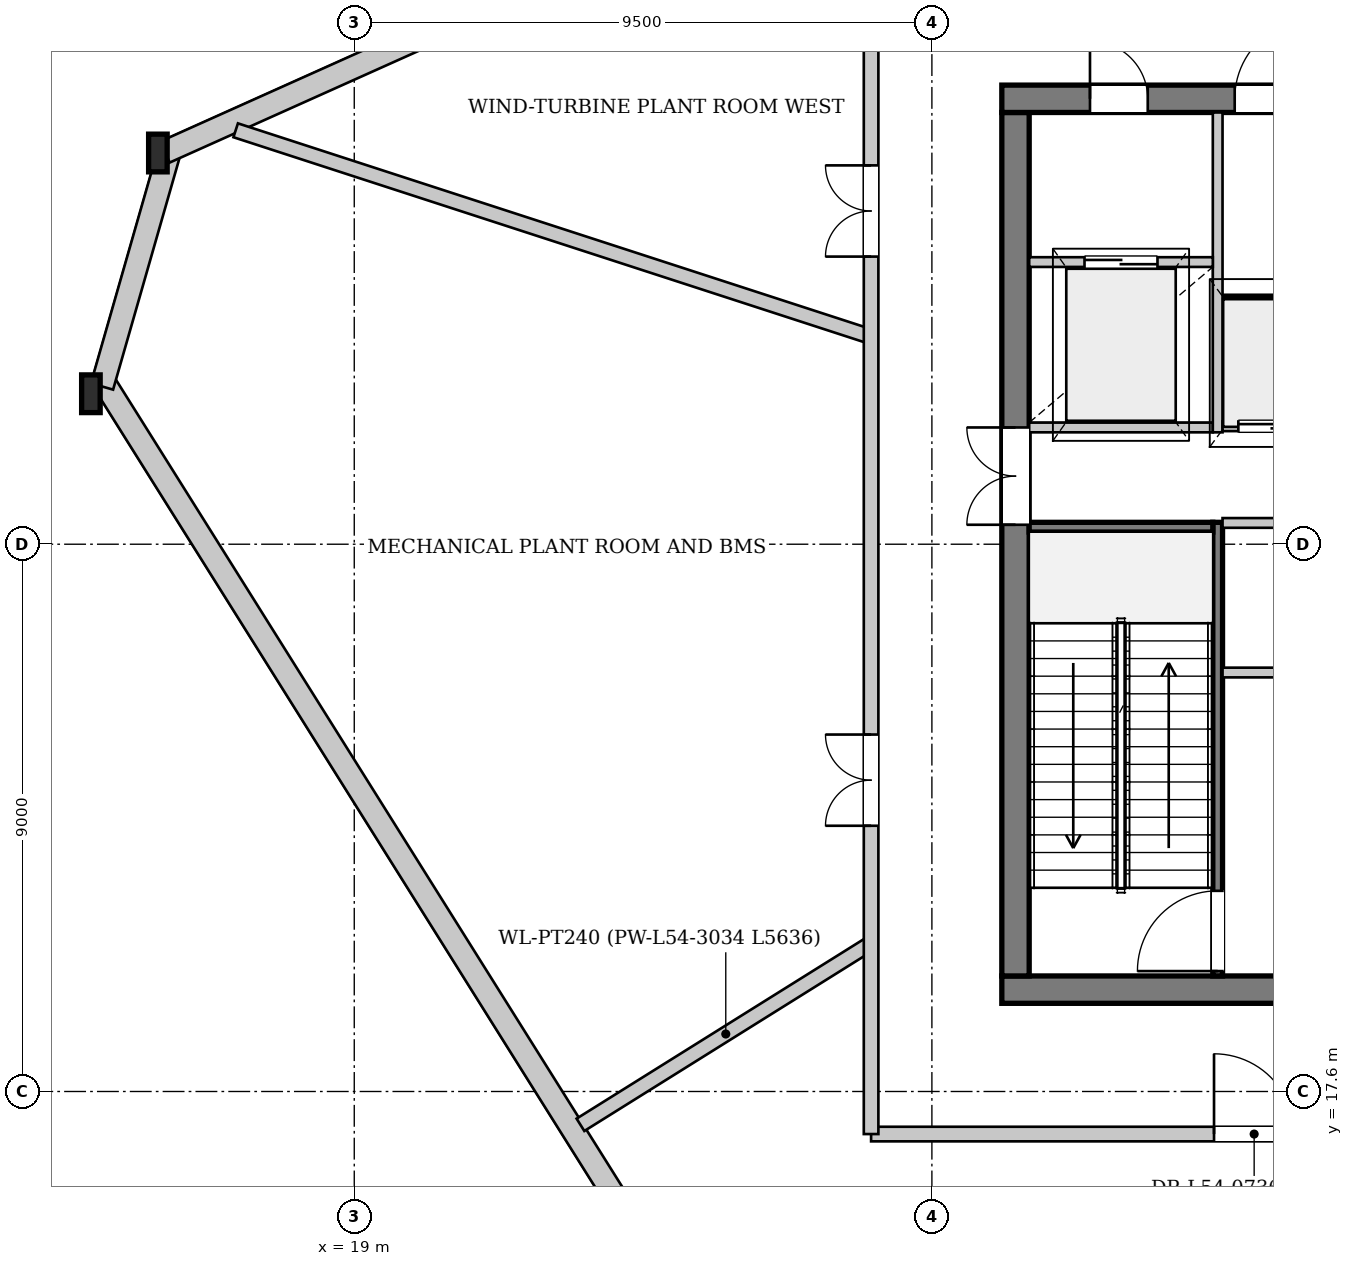
"""IFC4 building model, lengths in metres.
Left out: names, types, materials, properties, quantities, classifications, styles, units other than length and angle.
Written with IfcOpenShell. Run it as: python <this file> out.ifc"""

import sys

from ifc_helpers import new_model, si_unit, direction, frame, frame_2d, origin, origin_2d, place, context, subcontext, project, spatial, rectangle, i_section, extrude, source, transform, mapped, element, fill, save


model = new_model("IFC4")
c1 = context("Model", 3, precision=1e-05, world=origin(), true_north=direction((0.0, 1.0)))
c2 = subcontext(c1, "Body", "Model", "MODEL_VIEW")
j1 = project(units=[si_unit("LENGTHUNIT", "METRE"), si_unit("PLANEANGLEUNIT", "RADIAN")], contexts=[c1])
p1 = place(None, origin())
s1 = spatial("IfcSite", under=j1, at=p1, CompositionType="ELEMENT")
p2 = place(p1, origin())
s2 = spatial("IfcBuilding", under=s1, at=p2, CompositionType="ELEMENT")
p3 = place(p2, frame((0.0, 0.0, 204.3)))
s3 = spatial("IfcBuildingStorey", under=s2, at=p3, CompositionType="ELEMENT", Elevation=204.3)
m1 = source(origin(), c2, "Body", "SweptSolid", [
    extrude(i_section(OverallWidth=0.305, OverallDepth=0.62, WebThickness=0.021, FlangeThickness=0.04, at=origin_2d()), origin(), (0.0, 0.0, 1.0), 5.149),
])
p4 = place(p3, frame((15.809, 33.223, 0.0), z_axis=(-0.014792046228, -0.0735335375, 0.997183039482), x_axis=(0.980361267352, -0.19721000349, 0.0)))
e1 = element("IfcColumn", 1, at=p4, inside=s3, PredefinedType="COLUMN", context=c2, shape_type="MappedRepresentation", body=[
    mapped(m1, transform((0.0, 0.0, 0.0), x_axis=(1.0, 0.0, 0.0), y_axis=(0.0, 1.0, 0.0), z_axis=(0.0, 0.0, 1.0), scale=1.0)),
])
m2 = source(origin(), c2, "Body", "SweptSolid", [
    extrude(i_section(OverallWidth=0.305, OverallDepth=0.62, WebThickness=0.021, FlangeThickness=0.04, at=origin_2d()), origin(), (0.0, 0.0, 1.0), 5.146),
])
p5 = place(p3, frame((14.668, 29.247, 0.0), z_axis=(4.743756e-05, -0.066981834351, 0.997754193986), x_axis=(0.999999749216, 0.00070821512, 0.0)))
e2 = element("IfcColumn", 2, at=p5, inside=s3, PredefinedType="COLUMN", context=c2, shape_type="MappedRepresentation", body=[
    mapped(m2, transform((0.0, 0.0, 0.0), x_axis=(1.0, 0.0, 0.0), y_axis=(0.0, 1.0, 0.0), z_axis=(0.0, 0.0, 1.0), scale=1.0)),
])
p6 = place(p3, frame((24.242, 14.344, 0.0), z_axis=(0.0, 0.0, 1.0), x_axis=(-0.531419317525, 0.847108912101, 0.0)))
e3 = element("IfcWall", 3, at=p6, inside=s3, PredefinedType="SOLIDWALL", context=c2, shape_type="SweptSolid", body=[
    extrude(rectangle(XDim=17.712, YDim=0.38, at=frame_2d((8.856, 0.0))), origin(), (0.0, 0.0, 1.0), 4.572),
])
p7 = place(p3, frame((14.851, 29.194, 0.0), z_axis=(0.0, 0.0, 1.0), x_axis=(0.27564088165, 0.961260684915, 0.0)))
e4 = element("IfcWall", 4, at=p7, inside=s3, PredefinedType="SOLIDWALL", context=c2, shape_type="SweptSolid", body=[
    extrude(rectangle(XDim=4.136, YDim=0.38, at=frame_2d((2.068, 0.0))), origin(), (0.0, 0.0, 1.0), 4.572),
])
p8 = place(p3, frame((15.886, 33.05, 0.0), z_axis=(0.0, 0.0, 1.0), x_axis=(0.912383830261, 0.409335737845, 0.0)))
e5 = element("IfcWall", 5, at=p8, inside=s3, PredefinedType="SOLIDWALL", context=c2, shape_type="SweptSolid", body=[
    extrude(rectangle(XDim=22.569, YDim=0.38, at=frame_2d((11.284, 0.0))), origin(), (0.0, 0.0, 1.0), 4.572),
])
p9 = place(p3, frame((46.35, 19.275, 0.0), z_axis=(0.0, 0.0, 1.0), x_axis=(-1.0, 0.0, 0.0)))
e6 = element("IfcWall", 6, at=p9, inside=s3, PredefinedType="SHEAR", context=c2, shape_type="SweptSolid", body=[
    extrude(rectangle(XDim=16.7, YDim=0.45, at=frame_2d((8.35, 0.0))), origin(), (0.0, 0.0, 1.0), 5.08),
])
p10 = place(p9, frame((4.55, 0.0, 0.0)))
e7 = element("IfcOpeningElement", 7, at=p10, cuts=e6, PredefinedType="OPENING", context=c2, shape_type="SweptSolid", body=[
    extrude(rectangle(XDim=1.12, YDim=2.25, at=frame_2d((0.56, 1.125))), frame((0.0, 0.235, 0.0), z_axis=(0.0, -1.0, 0.0), x_axis=(1.0, 0.0, 0.0)), (0.0, 0.0, 1.0), 0.47),
])
p11 = place(p9, frame((11.05, 0.0, 0.0)))
e8 = element("IfcOpeningElement", 8, at=p11, cuts=e6, PredefinedType="OPENING", context=c2, shape_type="SweptSolid", body=[
    extrude(rectangle(XDim=1.12, YDim=2.25, at=frame_2d((0.56, 1.125))), frame((0.0, 0.235, 0.0), z_axis=(0.0, -1.0, 0.0), x_axis=(1.0, 0.0, 0.0)), (0.0, 0.0, 1.0), 0.47),
])
p12 = place(p3, frame((29.875, 19.5, 0.0), z_axis=(0.0, 0.0, 1.0), x_axis=(0.0, 1.0, 0.0)))
e9 = element("IfcWall", 9, at=p12, inside=s3, PredefinedType="SHEAR", context=c2, shape_type="SweptSolid", body=[
    extrude(rectangle(XDim=14.2, YDim=0.45, at=frame_2d((7.1, 0.0))), origin(), (0.0, 0.0, 1.0), 5.08),
])
p13 = place(p12, frame((7.42, 0.0, 0.0)))
e10 = element("IfcOpeningElement", 10, at=p13, cuts=e9, PredefinedType="OPENING", context=c2, shape_type="SweptSolid", body=[
    extrude(rectangle(XDim=1.6, YDim=2.2, at=frame_2d((0.8, 1.1))), frame((0.0, 0.235, 0.0), z_axis=(0.0, -1.0, 0.0), x_axis=(1.0, 0.0, 0.0)), (0.0, 0.0, 1.0), 0.47),
])
p14 = place(p3, frame((29.65, 33.925, 0.0), z_axis=(0.0, 0.0, 1.0), x_axis=(1.0, 0.0, 0.0)))
e11 = element("IfcWall", 11, at=p14, inside=s3, PredefinedType="SHEAR", context=c2, shape_type="SweptSolid", body=[
    extrude(rectangle(XDim=16.7, YDim=0.45, at=frame_2d((8.35, 0.0))), origin(), (0.0, 0.0, 1.0), 5.08),
])
p15 = place(p14, frame((1.45, 0.0, 0.0)))
e12 = element("IfcOpeningElement", 12, at=p15, cuts=e11, PredefinedType="OPENING", context=c2, shape_type="SweptSolid", body=[
    extrude(rectangle(XDim=0.95, YDim=2.1, at=frame_2d((0.475, 1.05))), frame((0.0, 0.235, 0.0), z_axis=(0.0, -1.0, 0.0), x_axis=(1.0, 0.0, 0.0)), (0.0, 0.0, 1.0), 0.47),
])
p16 = place(p14, frame((3.83, 0.0, 0.0)))
e13 = element("IfcOpeningElement", 13, at=p16, cuts=e11, PredefinedType="OPENING", context=c2, shape_type="SweptSolid", body=[
    extrude(rectangle(XDim=1.32, YDim=2.2, at=frame_2d((0.66, 1.1))), frame((0.0, 0.235, 0.0), z_axis=(0.0, -1.0, 0.0), x_axis=(1.0, 0.0, 0.0)), (0.0, 0.0, 1.0), 0.47),
])
p17 = place(p3, frame((33.2, 19.5, 0.0), z_axis=(0.0, 0.0, 1.0), x_axis=(0.0, 1.0, 0.0)))
e14 = element("IfcWall", 14, at=p17, inside=s3, PredefinedType="PARTITIONING", context=c2, shape_type="SweptSolid", body=[
    extrude(rectangle(XDim=7.46, YDim=0.16, at=frame_2d((3.73, 0.0))), origin(), (0.0, 0.0, 1.0), 5.08),
])
p18 = place(p17, frame((0.08, 0.0, 0.0)))
e15 = element("IfcOpeningElement", 15, at=p18, cuts=e14, PredefinedType="OPENING", context=c2, shape_type="SweptSolid", body=[
    extrude(rectangle(XDim=1.32, YDim=2.2, at=frame_2d((0.66, 1.1))), frame((0.0, 0.09, 0.0), z_axis=(0.0, -1.0, 0.0), x_axis=(1.0, 0.0, 0.0)), (0.0, 0.0, 1.0), 0.18),
])
p19 = place(p3, frame((30.1, 26.88, 0.0), z_axis=(0.0, 0.0, 1.0), x_axis=(1.0, 0.0, 0.0)))
e16 = element("IfcWall", 16, at=p19, inside=s3, PredefinedType="PARTITIONING", context=c2, shape_type="SweptSolid", body=[
    extrude(rectangle(XDim=3.02, YDim=0.16, at=frame_2d((1.51, 0.0))), origin(), (0.0, 0.0, 1.0), 5.08),
])
p20 = place(p3, frame((33.28, 30.6, 0.0), z_axis=(0.0, 0.0, 1.0), x_axis=(1.0, 0.0, 0.0)))
e17 = element("IfcWall", 17, at=p20, inside=s3, PredefinedType="PARTITIONING", context=c2, shape_type="SweptSolid", body=[
    extrude(rectangle(XDim=7.3, YDim=0.16, at=frame_2d((3.65, 0.0))), origin(), (0.0, 0.0, 1.0), 5.08),
])
p21 = place(p3, frame((33.28, 24.49, 0.0), z_axis=(0.0, 0.0, 1.0), x_axis=(1.0, 0.0, 0.0)))
e18 = element("IfcWall", 18, at=p21, inside=s3, PredefinedType="PARTITIONING", context=c2, shape_type="SweptSolid", body=[
    extrude(rectangle(XDim=9.44, YDim=0.16, at=frame_2d((4.72, 0.0))), origin(), (0.0, 0.0, 1.0), 5.08),
])
p22 = place(p3, frame((30.1, 28.52, 0.0), z_axis=(0.0, 0.0, 1.0), x_axis=(1.0, 0.0, 0.0)))
e19 = element("IfcWall", 19, at=p22, inside=s3, PredefinedType="PARTITIONING", context=c2, shape_type="SweptSolid", body=[
    extrude(rectangle(XDim=3.02, YDim=0.16, at=frame_2d((1.51, 0.0))), origin(), (0.0, 0.0, 1.0), 5.08),
])
p23 = place(p3, frame((33.2, 28.44, 0.0), z_axis=(0.0, 0.0, 1.0), x_axis=(0.0, 1.0, 0.0)))
e20 = element("IfcWall", 20, at=p23, inside=s3, PredefinedType="PARTITIONING", context=c2, shape_type="SweptSolid", body=[
    extrude(rectangle(XDim=5.26, YDim=0.16, at=frame_2d((2.63, 0.0))), origin(), (0.0, 0.0, 1.0), 5.08),
])
p24 = place(p3, frame((30.1, 31.24, 0.0), z_axis=(0.0, 0.0, 1.0), x_axis=(1.0, 0.0, 0.0)))
e21 = element("IfcWall", 21, at=p24, inside=s3, PredefinedType="PARTITIONING", context=c2, shape_type="SweptSolid", body=[
    extrude(rectangle(XDim=3.02, YDim=0.16, at=frame_2d((1.51, 0.0))), origin(), (0.0, 0.0, 1.0), 5.08),
])
p25 = place(p24, frame((0.91, 0.0, 0.0)))
e22 = element("IfcOpeningElement", 22, at=p25, cuts=e21, PredefinedType="OPENING", context=c2, shape_type="SweptSolid", body=[
    extrude(rectangle(XDim=1.2, YDim=2.2, at=frame_2d((0.6, 1.1))), frame((0.0, 0.09, 0.0), z_axis=(0.0, -1.0, 0.0), x_axis=(1.0, 0.0, 0.0)), (0.0, 0.0, 1.0), 0.18),
])
p26 = place(p3, frame((33.28, 26.95, 0.0), z_axis=(0.0, 0.0, 1.0), x_axis=(1.0, 0.0, 0.0)))
e23 = element("IfcWall", 23, at=p26, inside=s3, PredefinedType="PARTITIONING", context=c2, shape_type="SweptSolid", body=[
    extrude(rectangle(XDim=9.44, YDim=0.16, at=frame_2d((4.72, 0.0))), origin(), (0.0, 0.0, 1.0), 5.08),
])
p27 = place(p26, frame((1.2, 0.0, 0.0)))
e24 = element("IfcOpeningElement", 24, at=p27, cuts=e23, PredefinedType="OPENING", context=c2, shape_type="SweptSolid", body=[
    extrude(rectangle(XDim=0.95, YDim=2.1, at=frame_2d((0.475, 1.05))), frame((0.0, 0.09, 0.0), z_axis=(0.0, -1.0, 0.0), x_axis=(1.0, 0.0, 0.0)), (0.0, 0.0, 1.0), 0.18),
])
p28 = place(p26, frame((4.65, 0.0, 0.0)))
e25 = element("IfcOpeningElement", 25, at=p28, cuts=e23, PredefinedType="OPENING", context=c2, shape_type="SweptSolid", body=[
    extrude(rectangle(XDim=0.95, YDim=2.1, at=frame_2d((0.475, 1.05))), frame((0.0, 0.09, 0.0), z_axis=(0.0, -1.0, 0.0), x_axis=(1.0, 0.0, 0.0)), (0.0, 0.0, 1.0), 0.18),
])
p29 = place(p26, frame((7.67, 0.0, 0.0)))
e26 = element("IfcOpeningElement", 26, at=p29, cuts=e23, PredefinedType="OPENING", context=c2, shape_type="SweptSolid", body=[
    extrude(rectangle(XDim=1.1, YDim=2.2, at=frame_2d((0.55, 1.1))), frame((0.0, 0.09, 0.0), z_axis=(0.0, -1.0, 0.0), x_axis=(1.0, 0.0, 0.0)), (0.0, 0.0, 1.0), 0.18),
])
p30 = place(p3, frame((33.28, 28.54, 0.0), z_axis=(0.0, 0.0, 1.0), x_axis=(1.0, 0.0, 0.0)))
e27 = element("IfcWall", 27, at=p30, inside=s3, PredefinedType="PARTITIONING", context=c2, shape_type="SweptSolid", body=[
    extrude(rectangle(XDim=12.62, YDim=0.16, at=frame_2d((6.31, 0.0))), origin(), (0.0, 0.0, 1.0), 5.08),
])
p31 = place(p30, frame((0.26, 0.0, 0.0)))
e28 = element("IfcOpeningElement", 28, at=p31, cuts=e27, PredefinedType="OPENING", context=c2, shape_type="SweptSolid", body=[
    extrude(rectangle(XDim=1.1, YDim=2.2, at=frame_2d((0.55, 1.1))), frame((0.0, 0.09, 0.0), z_axis=(0.0, -1.0, 0.0), x_axis=(1.0, 0.0, 0.0)), (0.0, 0.0, 1.0), 0.18),
])
p32 = place(p30, frame((2.01, 0.0, 0.0)))
e29 = element("IfcOpeningElement", 29, at=p32, cuts=e27, PredefinedType="OPENING", context=c2, shape_type="SweptSolid", body=[
    extrude(rectangle(XDim=1.1, YDim=2.2, at=frame_2d((0.55, 1.1))), frame((0.0, 0.09, 0.0), z_axis=(0.0, -1.0, 0.0), x_axis=(1.0, 0.0, 0.0)), (0.0, 0.0, 1.0), 0.18),
])
p33 = place(p30, frame((3.76, 0.0, 0.0)))
e30 = element("IfcOpeningElement", 30, at=p33, cuts=e27, PredefinedType="OPENING", context=c2, shape_type="SweptSolid", body=[
    extrude(rectangle(XDim=1.1, YDim=2.2, at=frame_2d((0.55, 1.1))), frame((0.0, 0.09, 0.0), z_axis=(0.0, -1.0, 0.0), x_axis=(1.0, 0.0, 0.0)), (0.0, 0.0, 1.0), 0.18),
])
p34 = place(p3, frame((27.5, 20.039, 0.0), z_axis=(0.0, 0.0, 1.0), x_axis=(-0.848042103881, -0.529928853758, 0.0)))
e31 = element("IfcWall", 31, at=p34, inside=s3, PredefinedType="PARTITIONING", context=c2, shape_type="SweptSolid", body=[
    extrude(rectangle(XDim=5.636, YDim=0.24, at=frame_2d((2.818, 0.0))), origin(), (0.0, 0.0, 1.0), 5.08),
])
p35 = place(p3, frame((27.5, 30.012, 0.0), z_axis=(0.0, 0.0, 1.0), x_axis=(-0.951062149422, 0.308999656855, 0.0)))
e32 = element("IfcWall", 32, at=p35, inside=s3, PredefinedType="PARTITIONING", context=c2, shape_type="SweptSolid", body=[
    extrude(rectangle(XDim=10.988, YDim=0.24, at=frame_2d((5.494, 0.0))), origin(), (0.0, 0.0, 1.0), 5.08),
])
p36 = place(p3, frame((27.5, 16.9, 0.0), z_axis=(0.0, 0.0, 1.0), x_axis=(1.0, 0.0, 0.0)))
e33 = element("IfcWall", 33, at=p36, inside=s3, PredefinedType="PARTITIONING", context=c2, shape_type="SweptSolid", body=[
    extrude(rectangle(XDim=21.0, YDim=0.24, at=frame_2d((10.5, 0.0))), origin(), (0.0, 0.0, 1.0), 5.08),
])
p37 = place(p36, frame((5.64, 0.0, 0.0)))
e34 = element("IfcOpeningElement", 34, at=p37, cuts=e33, PredefinedType="OPENING", context=c2, shape_type="SweptSolid", body=[
    extrude(rectangle(XDim=1.32, YDim=2.2, at=frame_2d((0.66, 1.1))), frame((0.0, 0.13, 0.0), z_axis=(0.0, -1.0, 0.0), x_axis=(1.0, 0.0, 0.0)), (0.0, 0.0, 1.0), 0.26),
])
p38 = place(p36, frame((14.04, 0.0, 0.0)))
e35 = element("IfcOpeningElement", 35, at=p38, cuts=e33, PredefinedType="OPENING", context=c2, shape_type="SweptSolid", body=[
    extrude(rectangle(XDim=1.5, YDim=2.25, at=frame_2d((0.75, 1.125))), frame((0.0, 0.13, 0.0), z_axis=(0.0, -1.0, 0.0), x_axis=(1.0, 0.0, 0.0)), (0.0, 0.0, 1.0), 0.26),
])
p39 = place(p3, frame((27.5, 16.9, 0.0), z_axis=(0.0, 0.0, 1.0), x_axis=(0.0, 1.0, 0.0)))
e36 = element("IfcWall", 36, at=p39, inside=s3, PredefinedType="PARTITIONING", context=c2, shape_type="SweptSolid", body=[
    extrude(rectangle(XDim=19.4, YDim=0.24, at=frame_2d((9.7, 0.0))), origin(), (0.0, 0.0, 1.0), 5.08),
])
p40 = place(p39, frame((5.07, 0.0, 0.0)))
e37 = element("IfcOpeningElement", 37, at=p40, cuts=e36, PredefinedType="OPENING", context=c2, shape_type="SweptSolid", body=[
    extrude(rectangle(XDim=1.5, YDim=2.25, at=frame_2d((0.75, 1.125))), frame((0.0, 0.13, 0.0), z_axis=(0.0, -1.0, 0.0), x_axis=(1.0, 0.0, 0.0)), (0.0, 0.0, 1.0), 0.26),
])
p41 = place(p39, frame((14.43, 0.0, 0.0)))
e38 = element("IfcOpeningElement", 38, at=p41, cuts=e36, PredefinedType="OPENING", context=c2, shape_type="SweptSolid", body=[
    extrude(rectangle(XDim=1.5, YDim=2.25, at=frame_2d((0.75, 1.125))), frame((0.0, 0.13, 0.0), z_axis=(0.0, -1.0, 0.0), x_axis=(1.0, 0.0, 0.0)), (0.0, 0.0, 1.0), 0.26),
])
m3 = source(origin(), c2, "Body", "SweptSolid", [
    extrude(rectangle(XDim=1.6, YDim=2.2, at=frame_2d((0.8, 1.1))), frame((0.0, 0.025, 0.0), z_axis=(0.0, -1.0, 0.0), x_axis=(1.0, 0.0, 0.0)), (0.0, 0.0, 1.0), 0.05),
])
p42 = place(p13, origin())
e39 = element("IfcDoor", 39, at=p42, inside=s3, OperationType="DOUBLE_DOOR_SINGLE_SWING", PredefinedType="DOOR", context=c2, shape_type="MappedRepresentation", body=[
    mapped(m3, transform((0.0, 0.0, 0.0), x_axis=(1.0, 0.0, 0.0), y_axis=(0.0, 1.0, 0.0), z_axis=(0.0, 0.0, 1.0), scale=1.0)),
])
fill(e10, e39)
m4 = source(origin(), c2, "Body", "SweptSolid", [
    extrude(rectangle(XDim=0.95, YDim=2.1, at=frame_2d((0.475, 1.05))), frame((0.0, 0.025, 0.0), z_axis=(0.0, -1.0, 0.0), x_axis=(1.0, 0.0, 0.0)), (0.0, 0.0, 1.0), 0.05),
])
p43 = place(p15, origin())
e40 = element("IfcDoor", 40, at=p43, inside=s3, OperationType="SINGLE_SWING_LEFT", PredefinedType="DOOR", context=c2, shape_type="MappedRepresentation", body=[
    mapped(m4, transform((0.0, 0.0, 0.0), x_axis=(1.0, 0.0, 0.0), y_axis=(0.0, 1.0, 0.0), z_axis=(0.0, 0.0, 1.0), scale=1.0)),
])
fill(e12, e40)
m5 = source(origin(), c2, "Body", "SweptSolid", [
    extrude(rectangle(XDim=1.32, YDim=2.2, at=frame_2d((0.66, 1.1))), frame((0.0, 0.025, 0.0), z_axis=(0.0, -1.0, 0.0), x_axis=(1.0, 0.0, 0.0)), (0.0, 0.0, 1.0), 0.05),
])
p44 = place(p16, origin())
e41 = element("IfcDoor", 41, at=p44, inside=s3, OperationType="SINGLE_SWING_RIGHT", PredefinedType="DOOR", context=c2, shape_type="MappedRepresentation", body=[
    mapped(m5, transform((0.0, 0.0, 0.0), x_axis=(1.0, 0.0, 0.0), y_axis=(0.0, 1.0, 0.0), z_axis=(0.0, 0.0, 1.0), scale=1.0)),
])
fill(e13, e41)
p45 = place(p18, origin())
e42 = element("IfcDoor", 42, at=p45, inside=s3, OperationType="SINGLE_SWING_LEFT", PredefinedType="DOOR", context=c2, shape_type="MappedRepresentation", body=[
    mapped(m5, transform((0.0, 0.0, 0.0), x_axis=(1.0, 0.0, 0.0), y_axis=(0.0, 1.0, 0.0), z_axis=(0.0, 0.0, 1.0), scale=1.0)),
])
fill(e15, e42)
m6 = source(origin(), c2, "Body", "SweptSolid", [
    extrude(rectangle(XDim=1.2, YDim=2.2, at=frame_2d((0.6, 1.1))), frame((0.0, 0.025, 0.0), z_axis=(0.0, -1.0, 0.0), x_axis=(1.0, 0.0, 0.0)), (0.0, 0.0, 1.0), 0.05),
])
p46 = place(p25, origin())
e43 = element("IfcDoor", 43, at=p46, inside=s3, OperationType="DOUBLE_DOOR_SLIDING", PredefinedType="DOOR", context=c2, shape_type="MappedRepresentation", body=[
    mapped(m6, transform((0.0, 0.0, 0.0), x_axis=(1.0, 0.0, 0.0), y_axis=(0.0, 1.0, 0.0), z_axis=(0.0, 0.0, 1.0), scale=1.0)),
])
fill(e22, e43)
m7 = source(origin(), c2, "Body", "SweptSolid", [
    extrude(rectangle(XDim=1.1, YDim=2.2, at=frame_2d((0.55, 1.1))), frame((0.0, 0.025, 0.0), z_axis=(0.0, -1.0, 0.0), x_axis=(1.0, 0.0, 0.0)), (0.0, 0.0, 1.0), 0.05),
])
p47 = place(p31, origin())
e44 = element("IfcDoor", 44, at=p47, inside=s3, OperationType="DOUBLE_DOOR_SLIDING", PredefinedType="DOOR", context=c2, shape_type="MappedRepresentation", body=[
    mapped(m7, transform((0.0, 0.0, 0.0), x_axis=(1.0, 0.0, 0.0), y_axis=(0.0, 1.0, 0.0), z_axis=(0.0, 0.0, 1.0), scale=1.0)),
])
fill(e28, e44)
p48 = place(p37, origin())
e45 = element("IfcDoor", 45, at=p48, inside=s3, OperationType="SINGLE_SWING_LEFT", PredefinedType="DOOR", context=c2, shape_type="MappedRepresentation", body=[
    mapped(m5, transform((0.0, 0.0, 0.0), x_axis=(1.0, 0.0, 0.0), y_axis=(0.0, 1.0, 0.0), z_axis=(0.0, 0.0, 1.0), scale=1.0)),
])
fill(e34, e45)
m8 = source(origin(), c2, "Body", "SweptSolid", [
    extrude(rectangle(XDim=1.5, YDim=2.25, at=frame_2d((0.75, 1.125))), frame((0.0, 0.025, 0.0), z_axis=(0.0, -1.0, 0.0), x_axis=(1.0, 0.0, 0.0)), (0.0, 0.0, 1.0), 0.05),
])
p49 = place(p40, origin())
e46 = element("IfcDoor", 46, at=p49, inside=s3, OperationType="DOUBLE_DOOR_SINGLE_SWING", PredefinedType="DOOR", context=c2, shape_type="MappedRepresentation", body=[
    mapped(m8, transform((0.0, 0.0, 0.0), x_axis=(1.0, 0.0, 0.0), y_axis=(0.0, 1.0, 0.0), z_axis=(0.0, 0.0, 1.0), scale=1.0)),
])
fill(e37, e46)
p50 = place(p41, origin())
e47 = element("IfcDoor", 47, at=p50, inside=s3, OperationType="DOUBLE_DOOR_SINGLE_SWING", PredefinedType="DOOR", context=c2, shape_type="MappedRepresentation", body=[
    mapped(m8, transform((0.0, 0.0, 0.0), x_axis=(1.0, 0.0, 0.0), y_axis=(0.0, 1.0, 0.0), z_axis=(0.0, 0.0, 1.0), scale=1.0)),
])
fill(e38, e47)
save(model, sys.argv[1])
